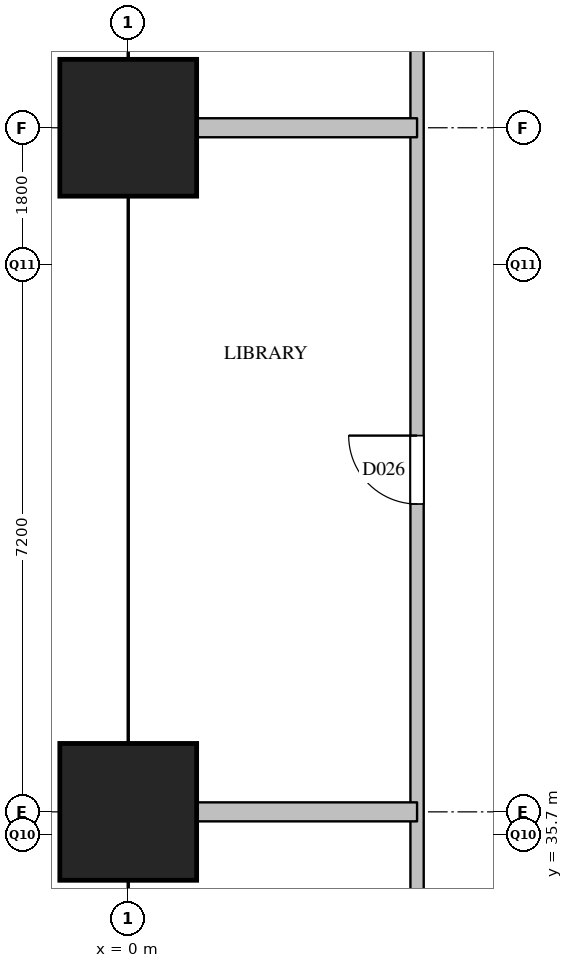
"""IFC4 building model, lengths in metres.
Left out: names, types, materials, properties, quantities, classifications, styles, units other than length and angle.
Written with IfcOpenShell. Run it as: python <this file> out.ifc"""

import sys

from ifc_helpers import new_model, si_unit, direction, frame, frame_2d, origin, origin_2d, place, context, subcontext, project, spatial, rectangle, extrude, element, fill, save


model = new_model("IFC4")
c1 = context("Model", 3, precision=1e-05, world=origin(), true_north=direction((0.0, 1.0)))
c2 = subcontext(c1, "Body", "Model", "MODEL_VIEW")
j1 = project(units=[si_unit("LENGTHUNIT", "METRE"), si_unit("PLANEANGLEUNIT", "RADIAN")], contexts=[c1])
p1 = place(None, origin())
s1 = spatial("IfcSite", under=j1, at=p1, CompositionType="ELEMENT")
p2 = place(p1, origin())
s2 = spatial("IfcBuilding", under=s1, at=p2, CompositionType="ELEMENT")
p3 = place(p2, frame((0.0, 0.0, 104.4)))
s3 = spatial("IfcBuildingStorey", under=s2, at=p3, CompositionType="ELEMENT", Elevation=104.4)
for number, where, z_axis, x_axis in (
    (1, (0.0, 36.0, 0.0), (0.0, 0.0, 1.0), (1.0, 0.0, 0.0)),
    (2, (0.0, 45.0, 0.0), (0.0, 0.0, 1.0), (1.0, 0.0, 0.0)),
):
    element("IfcColumn", number, at=place(p3, frame(where, z_axis=z_axis, x_axis=x_axis)), inside=s3, PredefinedType="COLUMN", context=c2, shape_type="SweptSolid", body=[
        extrude(rectangle(XDim=1.8, YDim=1.8, at=origin_2d()), origin(), (0.0, 0.0, 1.0), 3.8),
    ])
p4 = place(p3, frame((3.8, 28.5, 0.0), z_axis=(0.0, 0.0, 1.0), x_axis=(0.0, 1.0, 0.0)))
e3 = element("IfcWall", 3, at=p4, inside=s3, PredefinedType="PARTITIONING", context=c2, shape_type="SweptSolid", body=[
    extrude(rectangle(XDim=23.3, YDim=0.175, at=frame_2d((11.65, 0.0))), origin(), (0.0, 0.0, 1.0), 3.5),
])
p5 = place(p4, frame((3.3, 0.0, 0.0)))
e4 = element("IfcOpeningElement", 4, at=p5, cuts=e3, PredefinedType="OPENING", context=c2, shape_type="SweptSolid", body=[
    extrude(rectangle(XDim=0.9, YDim=2.1, at=frame_2d((0.45, 1.05))), frame((0.0, 0.097, 0.0), z_axis=(0.0, -1.0, 0.0), x_axis=(1.0, 0.0, 0.0)), (0.0, 0.0, 1.0), 0.195),
])
p6 = place(p4, frame((11.55, 0.0, 0.0)))
e5 = element("IfcOpeningElement", 5, at=p6, cuts=e3, PredefinedType="OPENING", context=c2, shape_type="SweptSolid", body=[
    extrude(rectangle(XDim=0.9, YDim=2.1, at=frame_2d((0.45, 1.05))), frame((0.0, 0.097, 0.0), z_axis=(0.0, -1.0, 0.0), x_axis=(1.0, 0.0, 0.0)), (0.0, 0.0, 1.0), 0.195),
])
p7 = place(p4, frame((19.45, 0.0, 0.0)))
e6 = element("IfcOpeningElement", 6, at=p7, cuts=e3, PredefinedType="OPENING", context=c2, shape_type="SweptSolid", body=[
    extrude(rectangle(XDim=0.9, YDim=2.1, at=frame_2d((0.45, 1.05))), frame((0.0, 0.097, 0.0), z_axis=(0.0, -1.0, 0.0), x_axis=(1.0, 0.0, 0.0)), (0.0, 0.0, 1.0), 0.195),
])
for number, where, z_axis, x_axis in (
    (7, (0.0, 36.0, 0.0), (0.0, 0.0, 1.0), (1.0, 0.0, 0.0)),
    (8, (0.0, 45.0, 0.0), (0.0, 0.0, 1.0), (1.0, 0.0, 0.0)),
):
    element("IfcWall", number, at=place(p3, frame(where, z_axis=z_axis, x_axis=x_axis)), inside=s3, PredefinedType="PARTITIONING", context=c2, shape_type="SweptSolid", body=[
        extrude(rectangle(XDim=3.8, YDim=0.25, at=frame_2d((1.9, 0.0))), origin(), (0.0, 0.0, 1.0), 3.5),
    ])
p8 = place(p6, origin())
e9 = element("IfcDoor", 9, at=p8, inside=s3, OperationType="SINGLE_SWING_RIGHT", PredefinedType="DOOR", context=c2, shape_type="SweptSolid", body=[
    extrude(rectangle(XDim=0.9, YDim=2.1, at=frame_2d((0.45, 1.05))), frame((0.0, 0.025, 0.0), z_axis=(0.0, -1.0, 0.0), x_axis=(1.0, 0.0, 0.0)), (0.0, 0.0, 1.0), 0.05),
])
fill(e5, e9)
save(model, sys.argv[1])
